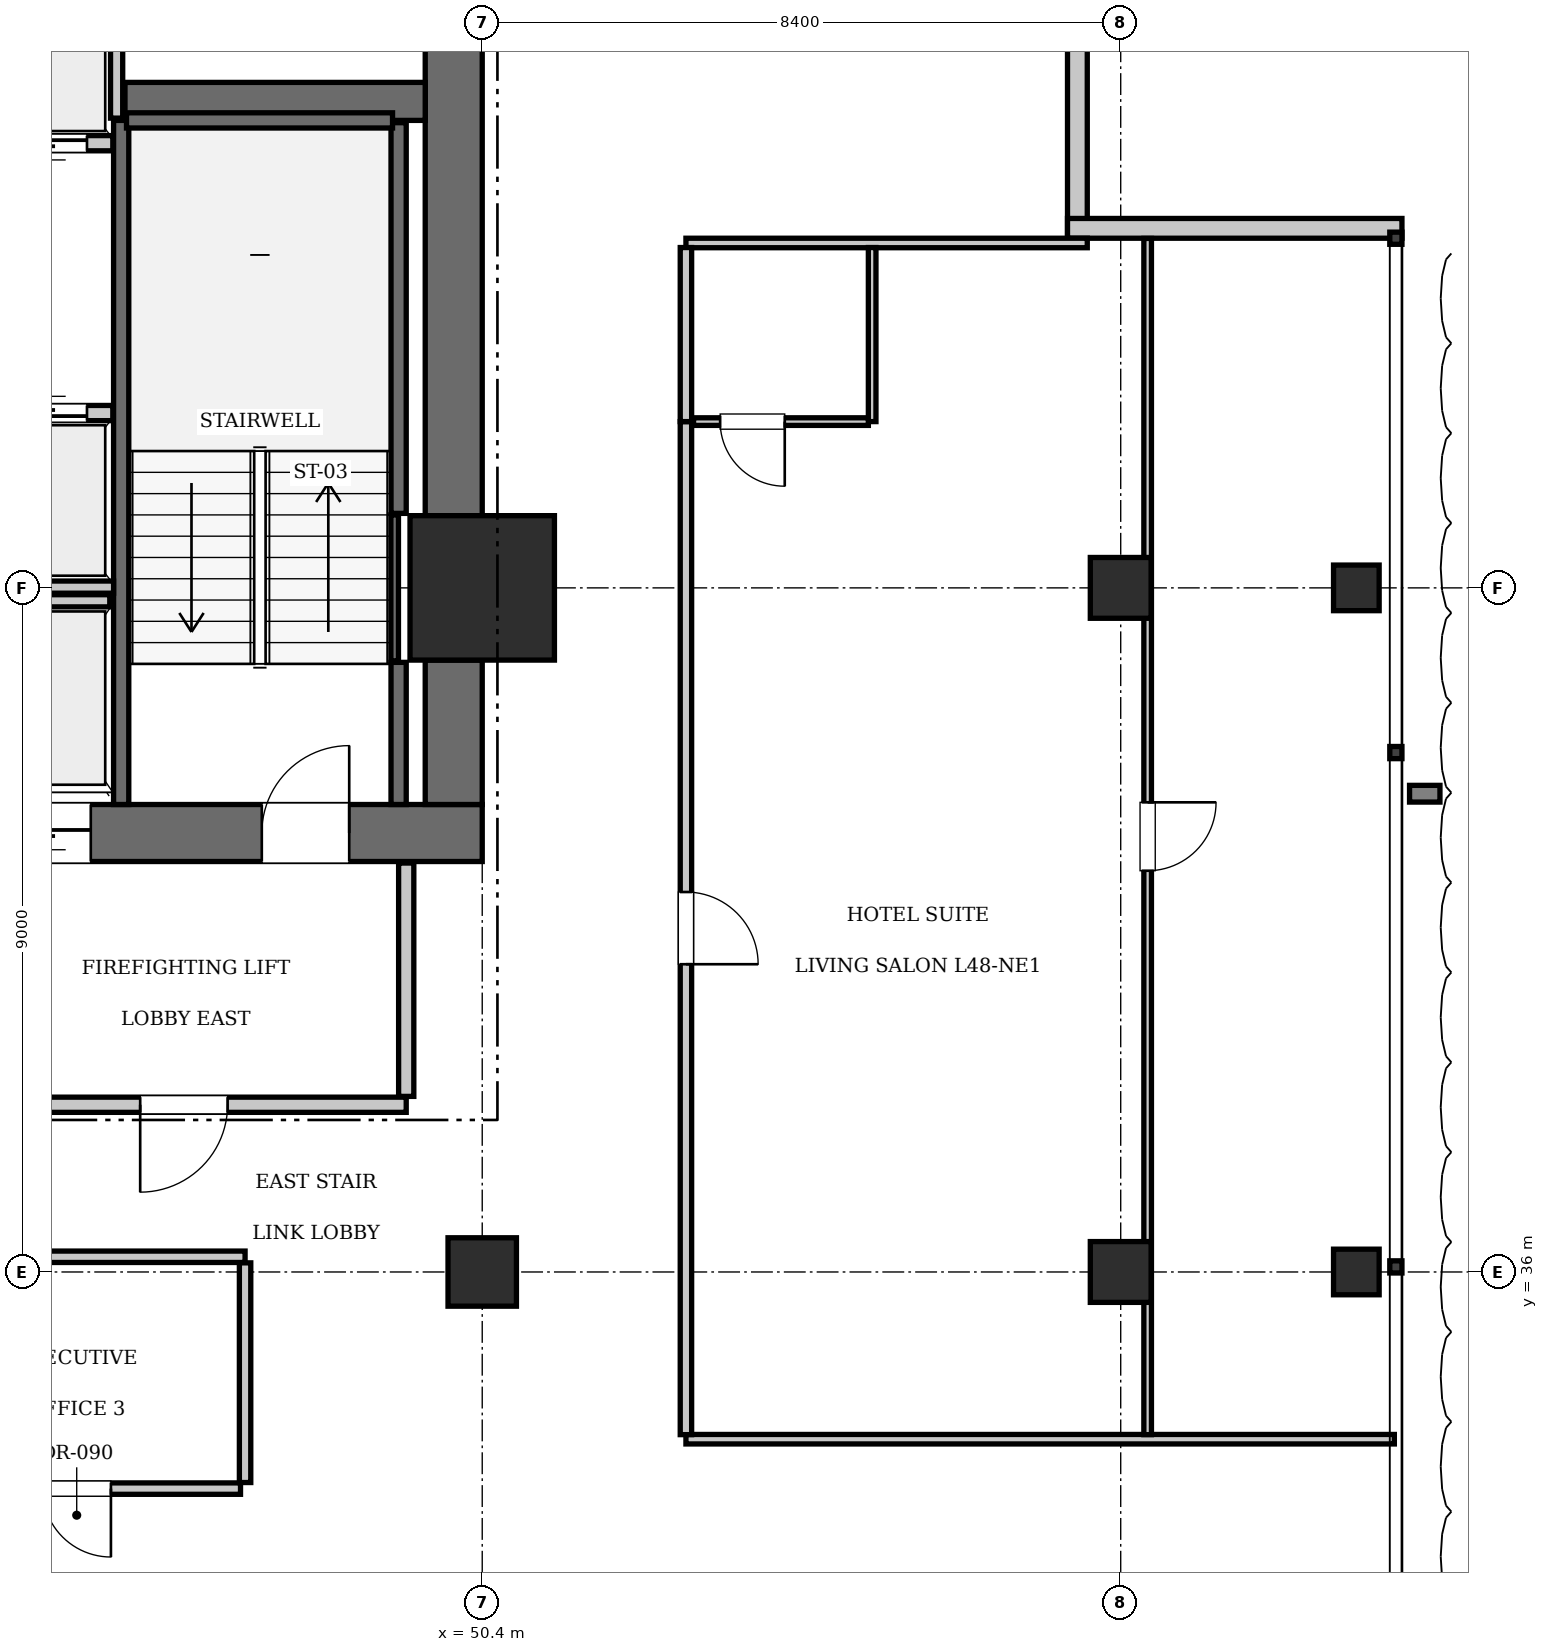
"""IFC4 building model, lengths in metres.
Left out: names, types, materials, properties, quantities, classifications, styles, units other than length and angle.
Written with IfcOpenShell. Run it as: python <this file> out.ifc"""

import sys

from ifc_helpers import new_model, si_unit, direction, frame, frame_2d, origin, origin_2d, place, context, subcontext, project, spatial, rectangle, i_section, extrude, element, fill, save


model = new_model("IFC4")
c1 = context("Model", 3, precision=1e-05, world=origin(), true_north=direction((0.0, 1.0)))
c2 = subcontext(c1, "Body", "Model", "MODEL_VIEW")
j1 = project(units=[si_unit("LENGTHUNIT", "METRE"), si_unit("PLANEANGLEUNIT", "RADIAN")], contexts=[c1])
p1 = place(None, origin())
s1 = spatial("IfcSite", under=j1, at=p1, CompositionType="ELEMENT")
p2 = place(p1, origin())
s2 = spatial("IfcBuilding", under=s1, at=p2, CompositionType="ELEMENT")
p3 = place(p2, frame((0.0, 0.0, 196.7)))
s3 = spatial("IfcBuildingStorey", under=s2, at=p3, CompositionType="ELEMENT", Elevation=196.7)
p4 = place(p3, frame((50.4, 45.0, 0.0), z_axis=(0.0, 0.0, 1.0), x_axis=(1.0, 0.0, 0.0)))
e1 = element("IfcColumn", 1, at=p4, inside=s3, PredefinedType="COLUMN", context=c2, shape_type="SweptSolid", body=[
    extrude(rectangle(XDim=1.9, YDim=1.9, at=origin_2d()), origin(), (0.0, 0.0, 1.0), 3.85),
])
p5 = place(p3, frame((43.6, 41.775, 0.0), z_axis=(0.0, 0.0, 1.0), x_axis=(1.0, 0.0, 0.0)))
e2 = element("IfcWall", 2, at=p5, inside=s3, PredefinedType="SHEAR", context=c2, shape_type="SweptSolid", body=[
    extrude(rectangle(XDim=6.8, YDim=0.75, at=frame_2d((3.4, 0.0))), origin(), (0.0, 0.0, 1.0), 3.85),
])
p6 = place(p5, frame((3.9, 0.0, 0.0)))
e3 = element("IfcOpeningElement", 3, at=p6, cuts=e2, PredefinedType="OPENING", context=c2, shape_type="SweptSolid", body=[
    extrude(rectangle(XDim=1.15, YDim=2.15, at=frame_2d((0.575, 1.075))), frame((0.0, 0.385, 0.0), z_axis=(0.0, -1.0, 0.0), x_axis=(1.0, 0.0, 0.0)), (0.0, 0.0, 1.0), 0.77),
])
p7 = place(p5, frame((0.55, 0.0, 0.0)))
e4 = element("IfcOpeningElement", 4, at=p7, cuts=e2, PredefinedType="OPENING", context=c2, shape_type="SweptSolid", body=[
    extrude(rectangle(XDim=1.1, YDim=2.2, at=frame_2d((0.55, 1.1))), frame((0.0, 0.385, 0.0), z_axis=(0.0, -1.0, 0.0), x_axis=(1.0, 0.0, 0.0)), (0.0, 0.0, 1.0), 0.77),
])
p8 = place(p3, frame((50.025, 42.15, 0.0), z_axis=(0.0, 0.0, 1.0), x_axis=(0.0, 1.0, 0.0)))
e5 = element("IfcWall", 5, at=p8, inside=s3, PredefinedType="SHEAR", context=c2, shape_type="SweptSolid", body=[
    extrude(rectangle(XDim=1.9, YDim=0.75, at=frame_2d((0.95, 0.0))), origin(), (0.0, 0.0, 1.0), 3.85),
])
p9 = place(p3, frame((50.025, 45.95, 0.0), z_axis=(0.0, 0.0, 1.0), x_axis=(0.0, 1.0, 0.0)))
e6 = element("IfcWall", 6, at=p9, inside=s3, PredefinedType="SHEAR", context=c2, shape_type="SweptSolid", body=[
    extrude(rectangle(XDim=7.3, YDim=0.75, at=frame_2d((3.65, 0.0))), origin(), (0.0, 0.0, 1.0), 3.85),
])
p10 = place(p3, frame((45.7, 51.4, 0.0), z_axis=(0.0, 0.0, 1.0), x_axis=(1.0, 0.0, 0.0)))
e7 = element("IfcWall", 7, at=p10, inside=s3, PredefinedType="SHEAR", context=c2, shape_type="SweptSolid", body=[
    extrude(rectangle(XDim=3.95, YDim=0.5, at=frame_2d((1.975, 0.0))), origin(), (0.0, 0.0, 1.0), 3.85),
])
p11 = place(p3, frame((50.4, 36.0, 0.0), z_axis=(0.0, 0.0, 1.0), x_axis=(1.0, 0.0, 0.0)))
e8 = element("IfcColumn", 8, at=p11, inside=s3, PredefinedType="COLUMN", context=c2, shape_type="SweptSolid", body=[
    extrude(rectangle(XDim=0.9, YDim=0.9, at=origin_2d()), origin(), (0.0, 0.0, 1.0), 3.85),
])
for number, where, z_axis, x_axis in (
    (9, (58.8, 36.0, 0.0), (0.0, 0.0, 1.0), (1.0, 0.0, 0.0)),
    (10, (58.8, 45.0, 0.0), (0.0, 0.0, 1.0), (1.0, 0.0, 0.0)),
):
    element("IfcColumn", number, at=place(p3, frame(where, z_axis=z_axis, x_axis=x_axis)), inside=s3, PredefinedType="COLUMN", context=c2, shape_type="SweptSolid", body=[
        extrude(rectangle(XDim=0.8, YDim=0.8, at=origin_2d()), origin(), (0.0, 0.0, 1.0), 3.85),
    ])
for number, where, z_axis, x_axis in (
    (11, (61.9, 36.0, 0.0), (0.0, 0.0, 1.0), (1.0, 0.0, 0.0)),
    (12, (61.9, 45.0, 0.0), (0.0, 0.0, 1.0), (1.0, 0.0, 0.0)),
):
    element("IfcColumn", number, at=place(p3, frame(where, z_axis=z_axis, x_axis=x_axis)), inside=s3, PredefinedType="COLUMN", context=c2, shape_type="SweptSolid", body=[
        extrude(i_section(OverallWidth=0.6, OverallDepth=0.6, WebThickness=0.025, FlangeThickness=0.038, at=origin_2d()), origin(), (0.0, 0.0, 1.0), 3.85),
    ])
p12 = place(p3, frame((45.65, 42.15, 0.0), z_axis=(0.0, 0.0, 1.0), x_axis=(0.0, 1.0, 0.0)))
e13 = element("IfcWall", 13, at=p12, inside=s3, PredefinedType="SOLIDWALL", context=c2, shape_type="SweptSolid", body=[
    extrude(rectangle(XDim=9.0, YDim=0.2, at=frame_2d((4.5, 0.0))), origin(), (0.0, 0.0, 1.0), 3.61),
])
p13 = place(p3, frame((49.3, 42.15, 0.0), z_axis=(0.0, 0.0, 1.0), x_axis=(0.0, 1.0, 0.0)))
e14 = element("IfcWall", 14, at=p13, inside=s3, PredefinedType="SOLIDWALL", context=c2, shape_type="SweptSolid", body=[
    extrude(rectangle(XDim=1.87, YDim=0.2, at=frame_2d((0.935, 0.0))), origin(), (0.0, 0.0, 1.0), 3.61),
])
p14 = place(p3, frame((49.3, 45.98, 0.0), z_axis=(0.0, 0.0, 1.0), x_axis=(0.0, 1.0, 0.0)))
e15 = element("IfcWall", 15, at=p14, inside=s3, PredefinedType="SOLIDWALL", context=c2, shape_type="SweptSolid", body=[
    extrude(rectangle(XDim=5.14, YDim=0.2, at=frame_2d((2.57, 0.0))), origin(), (0.0, 0.0, 1.0), 3.61),
])
p15 = place(p3, frame((45.72, 51.15, 0.0), z_axis=(0.0, 0.0, 1.0), x_axis=(1.0, 0.0, 0.0)))
e16 = element("IfcWall", 16, at=p15, inside=s3, PredefinedType="SOLIDWALL", context=c2, shape_type="SweptSolid", body=[
    extrude(rectangle(XDim=3.5, YDim=0.2, at=frame_2d((1.75, 0.0))), origin(), (0.0, 0.0, 1.0), 3.61),
])
p16 = place(p3, frame((49.248, 44.04, 0.0), z_axis=(0.0, 0.0, 1.0), x_axis=(0.0, 1.0, 0.0)))
e17 = element("IfcWall", 17, at=p16, inside=s3, PredefinedType="SOLIDWALL", context=c2, shape_type="SweptSolid", body=[
    extrude(rectangle(XDim=1.92, YDim=0.1, at=frame_2d((0.96, 0.0))), origin(), (0.0, 0.0, 1.0), 3.61),
])
p17 = place(p3, frame((43.86, 47.3, 0.0), z_axis=(0.0, 0.0, 1.0), x_axis=(1.0, 0.0, 0.0)))
e18 = element("IfcWall", 18, at=p17, inside=s3, PredefinedType="SOLIDWALL", context=c2, shape_type="SweptSolid", body=[
    extrude(rectangle(XDim=1.68, YDim=0.2, at=frame_2d((0.84, 0.0))), origin(), (0.0, 0.0, 1.0), 3.61),
])
p18 = place(p17, frame((0.34, 0.0, 0.0)))
e19 = element("IfcOpeningElement", 19, at=p18, cuts=e18, PredefinedType="OPENING", context=c2, shape_type="SweptSolid", body=[
    extrude(rectangle(XDim=1.0, YDim=2.15, at=frame_2d((0.5, 1.075))), frame((0.0, 0.11, 0.0), z_axis=(0.0, -1.0, 0.0), x_axis=(1.0, 0.0, 0.0)), (0.0, 0.0, 1.0), 0.22),
])
p19 = place(p3, frame((43.86, 50.85, 0.0), z_axis=(0.0, 0.0, 1.0), x_axis=(1.0, 0.0, 0.0)))
e20 = element("IfcWall", 20, at=p19, inside=s3, PredefinedType="SOLIDWALL", context=c2, shape_type="SweptSolid", body=[
    extrude(rectangle(XDim=1.68, YDim=0.2, at=frame_2d((0.84, 0.0))), origin(), (0.0, 0.0, 1.0), 3.61),
])
p20 = place(p19, frame((0.34, 0.0, 0.0)))
e21 = element("IfcOpeningElement", 21, at=p20, cuts=e20, PredefinedType="OPENING", context=c2, shape_type="SweptSolid", body=[
    extrude(rectangle(XDim=1.0, YDim=2.15, at=frame_2d((0.5, 1.075))), frame((0.0, 0.11, 0.0), z_axis=(0.0, -1.0, 0.0), x_axis=(1.0, 0.0, 0.0)), (0.0, 0.0, 1.0), 0.22),
])
p21 = place(p3, frame((43.9, 44.83, 0.0), z_axis=(0.0, 0.0, 1.0), x_axis=(1.0, 0.0, 0.0)))
e22 = element("IfcWall", 22, at=p21, inside=s3, PredefinedType="SOLIDWALL", context=c2, shape_type="SweptSolid", body=[
    extrude(rectangle(XDim=1.6, YDim=0.16, at=frame_2d((0.8, 0.0))), origin(), (0.0, 0.0, 1.0), 3.61),
])
p22 = place(p3, frame((42.1, 45.01, 0.0), z_axis=(0.0, 0.0, 1.0), x_axis=(1.0, 0.0, 0.0)))
e23 = element("IfcWall", 23, at=p22, inside=s3, PredefinedType="SOLIDWALL", context=c2, shape_type="SweptSolid", body=[
    extrude(rectangle(XDim=3.45, YDim=0.16, at=frame_2d((1.725, 0.0))), origin(), (0.0, 0.0, 1.0), 3.61),
])
p23 = place(p3, frame((45.59, 51.18, 0.0), z_axis=(0.0, 0.0, 1.0), x_axis=(0.0, 1.0, 0.0)))
e24 = element("IfcWall", 24, at=p23, inside=s3, PredefinedType="SOLIDWALL", context=c2, shape_type="SweptSolid", body=[
    extrude(rectangle(XDim=2.07, YDim=0.16, at=frame_2d((1.035, 0.0))), origin(), (0.0, 0.0, 1.0), 3.61),
])
for number, where, z_axis, x_axis in (
    (25, (58.23, 54.0, 0.0), (0.0, 0.0, 1.0), (0.0, -1.0, 0.0)),
    (26, (58.1, 49.73, 0.0), (0.0, 0.0, 1.0), (1.0, 0.0, 0.0)),
):
    element("IfcWall", number, at=place(p3, frame(where, z_axis=z_axis, x_axis=x_axis)), inside=s3, PredefinedType="SOLIDWALL", context=c2, shape_type="SweptSolid", body=[
        extrude(rectangle(XDim=4.4, YDim=0.26, at=frame_2d((2.2, 0.0))), origin(), (0.0, 0.0, 1.0), 3.61),
    ])
p24 = place(p3, frame((43.6, 38.2, 0.0), z_axis=(0.0, 0.0, 1.0), x_axis=(1.0, 0.0, 0.0)))
e27 = element("IfcWall", 27, at=p24, inside=s3, PredefinedType="PARTITIONING", context=c2, shape_type="SweptSolid", body=[
    extrude(rectangle(XDim=5.8, YDim=0.2, at=frame_2d((2.9, 0.0))), origin(), (0.0, 0.0, 1.0), 3.61),
])
p25 = place(p24, frame((2.3, 0.0, 0.0)))
e28 = element("IfcOpeningElement", 28, at=p25, cuts=e27, PredefinedType="OPENING", context=c2, shape_type="SweptSolid", body=[
    extrude(rectangle(XDim=1.15, YDim=2.15, at=frame_2d((0.575, 1.075))), frame((0.0, 0.11, 0.0), z_axis=(0.0, -1.0, 0.0), x_axis=(1.0, 0.0, 0.0)), (0.0, 0.0, 1.0), 0.22),
])
p26 = place(p3, frame((49.4, 38.31, 0.0), z_axis=(0.0, 0.0, 1.0), x_axis=(0.0, 1.0, 0.0)))
e29 = element("IfcWall", 29, at=p26, inside=s3, PredefinedType="PARTITIONING", context=c2, shape_type="SweptSolid", body=[
    extrude(rectangle(XDim=3.07, YDim=0.2, at=frame_2d((1.535, 0.0))), origin(), (0.0, 0.0, 1.0), 3.61),
])
p27 = place(p3, frame((42.85, 36.2, 0.0), z_axis=(0.0, 0.0, 1.0), x_axis=(1.0, 0.0, 0.0)))
e30 = element("IfcWall", 30, at=p27, inside=s3, PredefinedType="PARTITIONING", context=c2, shape_type="SweptSolid", body=[
    extrude(rectangle(XDim=4.43, YDim=0.15, at=frame_2d((2.215, 0.0))), origin(), (0.0, 0.0, 1.0), 3.61),
])
p28 = place(p3, frame((47.28, 33.23, 0.0), z_axis=(0.0, 0.0, 1.0), x_axis=(0.0, 1.0, 0.0)))
e31 = element("IfcWall", 31, at=p28, inside=s3, PredefinedType="PARTITIONING", context=c2, shape_type="SweptSolid", body=[
    extrude(rectangle(XDim=2.89, YDim=0.15, at=frame_2d((1.445, 0.0))), origin(), (0.0, 0.0, 1.0), 3.61),
])
p29 = place(p3, frame((42.91, 33.15, 0.0), z_axis=(0.0, 0.0, 1.0), x_axis=(1.0, 0.0, 0.0)))
e32 = element("IfcWall", 32, at=p29, inside=s3, PredefinedType="PARTITIONING", context=c2, shape_type="SweptSolid", body=[
    extrude(rectangle(XDim=4.31, YDim=0.15, at=frame_2d((2.155, 0.0))), origin(), (0.0, 0.0, 1.0), 3.61),
])
p30 = place(p29, frame((1.705, 0.0, 0.0)))
e33 = element("IfcOpeningElement", 33, at=p30, cuts=e32, PredefinedType="OPENING", context=c2, shape_type="SweptSolid", body=[
    extrude(rectangle(XDim=0.9, YDim=2.1, at=frame_2d((0.45, 1.05))), frame((0.0, 0.085, 0.0), z_axis=(0.0, -1.0, 0.0), x_axis=(1.0, 0.0, 0.0)), (0.0, 0.0, 1.0), 0.17),
])
p31 = place(p3, frame((53.08, 33.8, 0.0), z_axis=(0.0, 0.0, 1.0), x_axis=(1.0, 0.0, 0.0)))
e34 = element("IfcWall", 34, at=p31, inside=s3, PredefinedType="PARTITIONING", context=c2, shape_type="SweptSolid", body=[
    extrude(rectangle(XDim=9.32, YDim=0.125, at=frame_2d((4.66, 0.0))), origin(), (0.0, 0.0, 1.0), 3.61),
])
p32 = place(p3, frame((53.08, 49.538, 0.0), z_axis=(0.0, 0.0, 1.0), x_axis=(1.0, 0.0, 0.0)))
e35 = element("IfcWall", 35, at=p32, inside=s3, PredefinedType="PARTITIONING", context=c2, shape_type="SweptSolid", body=[
    extrude(rectangle(XDim=5.28, YDim=0.125, at=frame_2d((2.64, 0.0))), origin(), (0.0, 0.0, 1.0), 3.61),
])
p33 = place(p3, frame((53.08, 33.86, 0.0), z_axis=(0.0, 0.0, 1.0), x_axis=(0.0, 1.0, 0.0)))
e36 = element("IfcWall", 36, at=p33, inside=s3, PredefinedType="PARTITIONING", context=c2, shape_type="SweptSolid", body=[
    extrude(rectangle(XDim=13.327, YDim=0.15, at=frame_2d((6.664, 0.0))), origin(), (0.0, 0.0, 1.0), 3.61),
])
p34 = place(p33, frame((6.189, 0.0, 0.0)))
e37 = element("IfcOpeningElement", 37, at=p34, cuts=e36, PredefinedType="OPENING", context=c2, shape_type="SweptSolid", body=[
    extrude(rectangle(XDim=0.95, YDim=2.15, at=frame_2d((0.475, 1.075))), frame((0.0, 0.085, 0.0), z_axis=(0.0, -1.0, 0.0), x_axis=(1.0, 0.0, 0.0)), (0.0, 0.0, 1.0), 0.17),
])
p35 = place(p3, frame((53.08, 47.188, 0.0), z_axis=(0.0, 0.0, 1.0), x_axis=(0.0, 1.0, 0.0)))
e38 = element("IfcWall", 38, at=p35, inside=s3, PredefinedType="PARTITIONING", context=c2, shape_type="SweptSolid", body=[
    extrude(rectangle(XDim=2.29, YDim=0.15, at=frame_2d((1.145, 0.0))), origin(), (0.0, 0.0, 1.0), 3.61),
])
p36 = place(p3, frame((55.53, 47.188, 0.0), z_axis=(0.0, 0.0, 1.0), x_axis=(0.0, 1.0, 0.0)))
e39 = element("IfcWall", 39, at=p36, inside=s3, PredefinedType="PARTITIONING", context=c2, shape_type="SweptSolid", body=[
    extrude(rectangle(XDim=2.29, YDim=0.1, at=frame_2d((1.145, 0.0))), origin(), (0.0, 0.0, 1.0), 3.61),
])
p37 = place(p3, frame((53.18, 47.188, 0.0), z_axis=(0.0, 0.0, 1.0), x_axis=(1.0, 0.0, 0.0)))
e40 = element("IfcWall", 40, at=p37, inside=s3, PredefinedType="PARTITIONING", context=c2, shape_type="SweptSolid", body=[
    extrude(rectangle(XDim=2.3, YDim=0.1, at=frame_2d((1.15, 0.0))), origin(), (0.0, 0.0, 1.0), 3.61),
])
p38 = place(p37, frame((0.35, 0.0, 0.0)))
e41 = element("IfcOpeningElement", 41, at=p38, cuts=e40, PredefinedType="OPENING", context=c2, shape_type="SweptSolid", body=[
    extrude(rectangle(XDim=0.85, YDim=2.1, at=frame_2d((0.425, 1.05))), frame((0.0, 0.06, 0.0), z_axis=(0.0, -1.0, 0.0), x_axis=(1.0, 0.0, 0.0)), (0.0, 0.0, 1.0), 0.12),
])
p39 = place(p3, frame((59.154, 33.86, 0.0), z_axis=(0.0, 0.0, 1.0), x_axis=(0.0, 1.0, 0.0)))
e42 = element("IfcWall", 42, at=p39, inside=s3, PredefinedType="PARTITIONING", context=c2, shape_type="SweptSolid", body=[
    extrude(rectangle(XDim=15.737, YDim=0.1, at=frame_2d((7.869, 0.0))), origin(), (0.0, 0.0, 1.0), 3.61),
])
p40 = place(p39, frame((7.419, 0.0, 0.0)))
e43 = element("IfcOpeningElement", 43, at=p40, cuts=e42, PredefinedType="OPENING", context=c2, shape_type="SweptSolid", body=[
    extrude(rectangle(XDim=0.9, YDim=2.1, at=frame_2d((0.45, 1.05))), frame((0.0, 0.06, 0.0), z_axis=(0.0, -1.0, 0.0), x_axis=(1.0, 0.0, 0.0)), (0.0, 0.0, 1.0), 0.12),
])
p41 = place(p6, origin())
e44 = element("IfcDoor", 44, at=p41, inside=s3, OperationType="SINGLE_SWING_RIGHT", PredefinedType="DOOR", context=c2, shape_type="SweptSolid", body=[
    extrude(rectangle(XDim=1.15, YDim=2.15, at=frame_2d((0.575, 1.075))), frame((0.0, 0.025, 0.0), z_axis=(0.0, -1.0, 0.0), x_axis=(1.0, 0.0, 0.0)), (0.0, 0.0, 1.0), 0.05),
])
fill(e3, e44)
p42 = place(p18, origin())
e45 = element("IfcDoor", 45, at=p42, inside=s3, OperationType="SLIDING_TO_LEFT", PredefinedType="DOOR", context=c2, shape_type="SweptSolid", body=[
    extrude(rectangle(XDim=1.0, YDim=2.15, at=frame_2d((0.5, 1.075))), frame((0.0, 0.025, 0.0), z_axis=(0.0, -1.0, 0.0), x_axis=(1.0, 0.0, 0.0)), (0.0, 0.0, 1.0), 0.05),
])
fill(e19, e45)
p43 = place(p20, frame((1.0, 0.0, 0.0), z_axis=(0.0, 0.0, 1.0), x_axis=(-1.0, 0.0, 0.0)))
e46 = element("IfcDoor", 46, at=p43, inside=s3, OperationType="SLIDING_TO_LEFT", PredefinedType="DOOR", context=c2, shape_type="SweptSolid", body=[
    extrude(rectangle(XDim=1.0, YDim=2.15, at=frame_2d((0.5, 1.075))), frame((0.0, 0.025, 0.0), z_axis=(0.0, -1.0, 0.0), x_axis=(1.0, 0.0, 0.0)), (0.0, 0.0, 1.0), 0.05),
])
fill(e21, e46)
p44 = place(p7, frame((1.1, 0.0, 0.0), z_axis=(0.0, 0.0, 1.0), x_axis=(-1.0, 0.0, 0.0)))
e47 = element("IfcDoor", 47, at=p44, inside=s3, OperationType="SLIDING_TO_LEFT", PredefinedType="DOOR", context=c2, shape_type="SweptSolid", body=[
    extrude(rectangle(XDim=1.1, YDim=2.2, at=frame_2d((0.55, 1.1))), frame((0.0, 0.025, 0.0), z_axis=(0.0, -1.0, 0.0), x_axis=(1.0, 0.0, 0.0)), (0.0, 0.0, 1.0), 0.05),
])
fill(e4, e47)
p45 = place(p25, frame((1.15, 0.0, 0.0), z_axis=(0.0, 0.0, 1.0), x_axis=(-1.0, 0.0, 0.0)))
e48 = element("IfcDoor", 48, at=p45, inside=s3, OperationType="SINGLE_SWING_RIGHT", PredefinedType="DOOR", context=c2, shape_type="SweptSolid", body=[
    extrude(rectangle(XDim=1.15, YDim=2.15, at=frame_2d((0.575, 1.075))), frame((0.0, 0.025, 0.0), z_axis=(0.0, -1.0, 0.0), x_axis=(1.0, 0.0, 0.0)), (0.0, 0.0, 1.0), 0.05),
])
fill(e28, e48)
p46 = place(p30, frame((0.9, 0.0, 0.0), z_axis=(0.0, 0.0, 1.0), x_axis=(-1.0, 0.0, 0.0)))
e49 = element("IfcDoor", 49, at=p46, inside=s3, OperationType="SINGLE_SWING_LEFT", PredefinedType="DOOR", context=c2, shape_type="SweptSolid", body=[
    extrude(rectangle(XDim=0.9, YDim=2.1, at=frame_2d((0.45, 1.05))), frame((0.0, 0.025, 0.0), z_axis=(0.0, -1.0, 0.0), x_axis=(1.0, 0.0, 0.0)), (0.0, 0.0, 1.0), 0.05),
])
fill(e33, e49)
p47 = place(p38, frame((0.85, 0.0, 0.0), z_axis=(0.0, 0.0, 1.0), x_axis=(-1.0, 0.0, 0.0)))
e50 = element("IfcDoor", 50, at=p47, inside=s3, OperationType="SINGLE_SWING_LEFT", PredefinedType="DOOR", context=c2, shape_type="SweptSolid", body=[
    extrude(rectangle(XDim=0.85, YDim=2.1, at=frame_2d((0.425, 1.05))), frame((0.0, 0.025, 0.0), z_axis=(0.0, -1.0, 0.0), x_axis=(1.0, 0.0, 0.0)), (0.0, 0.0, 1.0), 0.05),
])
fill(e41, e50)
p48 = place(p34, frame((0.95, 0.0, 0.0), z_axis=(0.0, 0.0, 1.0), x_axis=(-1.0, 0.0, 0.0)))
e51 = element("IfcDoor", 51, at=p48, inside=s3, OperationType="SINGLE_SWING_RIGHT", PredefinedType="DOOR", context=c2, shape_type="SweptSolid", body=[
    extrude(rectangle(XDim=0.95, YDim=2.15, at=frame_2d((0.475, 1.075))), frame((0.0, 0.025, 0.0), z_axis=(0.0, -1.0, 0.0), x_axis=(1.0, 0.0, 0.0)), (0.0, 0.0, 1.0), 0.05),
])
fill(e37, e51)
p49 = place(p40, frame((0.9, 0.0, 0.0), z_axis=(0.0, 0.0, 1.0), x_axis=(-1.0, 0.0, 0.0)))
e52 = element("IfcDoor", 52, at=p49, inside=s3, OperationType="SINGLE_SWING_LEFT", PredefinedType="DOOR", context=c2, shape_type="SweptSolid", body=[
    extrude(rectangle(XDim=0.9, YDim=2.1, at=frame_2d((0.45, 1.05))), frame((0.0, 0.025, 0.0), z_axis=(0.0, -1.0, 0.0), x_axis=(1.0, 0.0, 0.0)), (0.0, 0.0, 1.0), 0.05),
])
fill(e43, e52)
save(model, sys.argv[1])
